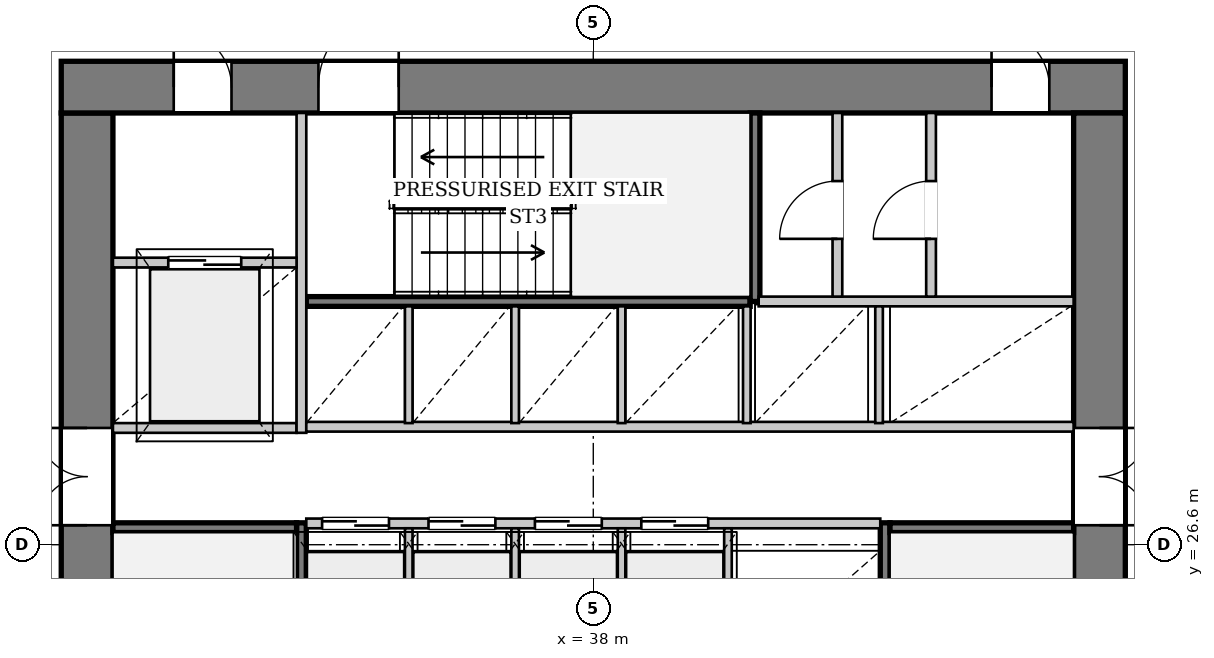
"""IFC4 building model, lengths in metres.
Left out: names, types, materials, properties, quantities, classifications, styles, units other than length and angle.
Written with IfcOpenShell. Run it as: python <this file> out.ifc"""

import sys

from ifc_helpers import new_model, si_unit, direction, frame, frame_2d, origin, place, context, subcontext, project, spatial, rectangle, extrude, source, transform, mapped, element, fill, save


model = new_model("IFC4")
c1 = context("Model", 3, precision=1e-05, world=origin(), true_north=direction((0.0, 1.0)))
c2 = subcontext(c1, "Body", "Model", "MODEL_VIEW")
j1 = project(units=[si_unit("LENGTHUNIT", "METRE"), si_unit("PLANEANGLEUNIT", "RADIAN")], contexts=[c1])
p1 = place(None, origin())
s1 = spatial("IfcSite", under=j1, at=p1, CompositionType="ELEMENT")
p2 = place(p1, origin())
s2 = spatial("IfcBuilding", under=s1, at=p2, CompositionType="ELEMENT")
p3 = place(p2, frame((0.0, 0.0, 61.25)))
s3 = spatial("IfcBuildingStorey", under=s2, at=p3, CompositionType="ELEMENT", Elevation=61.25)
p4 = place(p3, frame((29.675, 19.5, 0.0), z_axis=(0.0, 0.0, 1.0), x_axis=(0.0, 1.0, 0.0)))
e1 = element("IfcWall", 1, at=p4, inside=s3, PredefinedType="SHEAR", context=c2, shape_type="SweptSolid", body=[
    extrude(rectangle(XDim=14.2, YDim=0.85, at=frame_2d((7.1, 0.0))), origin(), (0.0, 0.0, 1.0), 3.3),
])
p5 = place(p4, frame((7.42, 0.0, 0.0)))
e2 = element("IfcOpeningElement", 2, at=p5, cuts=e1, PredefinedType="OPENING", context=c2, shape_type="SweptSolid", body=[
    extrude(rectangle(XDim=1.6, YDim=2.2, at=frame_2d((0.8, 1.1))), frame((0.0, 0.435, 0.0), z_axis=(0.0, -1.0, 0.0), x_axis=(1.0, 0.0, 0.0)), (0.0, 0.0, 1.0), 0.87),
])
p6 = place(p3, frame((29.25, 34.125, 0.0), z_axis=(0.0, 0.0, 1.0), x_axis=(1.0, 0.0, 0.0)))
e3 = element("IfcWall", 3, at=p6, inside=s3, PredefinedType="SHEAR", context=c2, shape_type="SweptSolid", body=[
    extrude(rectangle(XDim=17.5, YDim=0.85, at=frame_2d((8.75, 0.0))), origin(), (0.0, 0.0, 1.0), 3.3),
])
p7 = place(p6, frame((1.85, 0.0, 0.0)))
e4 = element("IfcOpeningElement", 4, at=p7, cuts=e3, PredefinedType="OPENING", context=c2, shape_type="SweptSolid", body=[
    extrude(rectangle(XDim=0.95, YDim=2.1, at=frame_2d((0.475, 1.05))), frame((0.0, 0.435, 0.0), z_axis=(0.0, -1.0, 0.0), x_axis=(1.0, 0.0, 0.0)), (0.0, 0.0, 1.0), 0.87),
])
p8 = place(p6, frame((4.23, 0.0, 0.0)))
e5 = element("IfcOpeningElement", 5, at=p8, cuts=e3, PredefinedType="OPENING", context=c2, shape_type="SweptSolid", body=[
    extrude(rectangle(XDim=1.32, YDim=2.2, at=frame_2d((0.66, 1.1))), frame((0.0, 0.435, 0.0), z_axis=(0.0, -1.0, 0.0), x_axis=(1.0, 0.0, 0.0)), (0.0, 0.0, 1.0), 0.87),
])
p9 = place(p6, frame((15.3, 0.0, 0.0)))
e6 = element("IfcOpeningElement", 6, at=p9, cuts=e3, PredefinedType="OPENING", context=c2, shape_type="SweptSolid", body=[
    extrude(rectangle(XDim=0.95, YDim=2.1, at=frame_2d((0.475, 1.05))), frame((0.0, 0.435, 0.0), z_axis=(0.0, -1.0, 0.0), x_axis=(1.0, 0.0, 0.0)), (0.0, 0.0, 1.0), 0.87),
])
p10 = place(p3, frame((46.325, 33.7, 0.0), z_axis=(0.0, 0.0, 1.0), x_axis=(0.0, -1.0, 0.0)))
e7 = element("IfcWall", 7, at=p10, inside=s3, PredefinedType="SHEAR", context=c2, shape_type="SweptSolid", body=[
    extrude(rectangle(XDim=14.2, YDim=0.85, at=frame_2d((7.1, 0.0))), origin(), (0.0, 0.0, 1.0), 3.3),
])
p11 = place(p10, frame((5.18, 0.0, 0.0)))
e8 = element("IfcOpeningElement", 8, at=p11, cuts=e7, PredefinedType="OPENING", context=c2, shape_type="SweptSolid", body=[
    extrude(rectangle(XDim=1.6, YDim=2.2, at=frame_2d((0.8, 1.1))), frame((0.0, 0.435, 0.0), z_axis=(0.0, -1.0, 0.0), x_axis=(1.0, 0.0, 0.0)), (0.0, 0.0, 1.0), 0.87),
])
p12 = place(p3, frame((33.2, 19.5, 0.0), z_axis=(0.0, 0.0, 1.0), x_axis=(0.0, 1.0, 0.0)))
e9 = element("IfcWall", 9, at=p12, inside=s3, PredefinedType="PARTITIONING", context=c2, shape_type="SweptSolid", body=[
    extrude(rectangle(XDim=7.46, YDim=0.16, at=frame_2d((3.73, 0.0))), origin(), (0.0, 0.0, 1.0), 3.3),
])
p13 = place(p12, frame((0.08, 0.0, 0.0)))
e10 = element("IfcOpeningElement", 10, at=p13, cuts=e9, PredefinedType="OPENING", context=c2, shape_type="SweptSolid", body=[
    extrude(rectangle(XDim=1.32, YDim=2.2, at=frame_2d((0.66, 1.1))), frame((0.0, 0.09, 0.0), z_axis=(0.0, -1.0, 0.0), x_axis=(1.0, 0.0, 0.0)), (0.0, 0.0, 1.0), 0.18),
])
p14 = place(p3, frame((30.1, 26.88, 0.0), z_axis=(0.0, 0.0, 1.0), x_axis=(1.0, 0.0, 0.0)))
e11 = element("IfcWall", 11, at=p14, inside=s3, PredefinedType="PARTITIONING", context=c2, shape_type="SweptSolid", body=[
    extrude(rectangle(XDim=3.02, YDim=0.16, at=frame_2d((1.51, 0.0))), origin(), (0.0, 0.0, 1.0), 3.3),
])
p15 = place(p3, frame((42.8, 26.96, 0.0), z_axis=(0.0, 0.0, 1.0), x_axis=(0.0, -1.0, 0.0)))
e12 = element("IfcWall", 12, at=p15, inside=s3, PredefinedType="PARTITIONING", context=c2, shape_type="SweptSolid", body=[
    extrude(rectangle(XDim=7.46, YDim=0.16, at=frame_2d((3.73, 0.0))), origin(), (0.0, 0.0, 1.0), 3.3),
])
p16 = place(p15, frame((6.06, 0.0, 0.0)))
e13 = element("IfcOpeningElement", 13, at=p16, cuts=e12, PredefinedType="OPENING", context=c2, shape_type="SweptSolid", body=[
    extrude(rectangle(XDim=1.32, YDim=2.2, at=frame_2d((0.66, 1.1))), frame((0.0, 0.09, 0.0), z_axis=(0.0, -1.0, 0.0), x_axis=(1.0, 0.0, 0.0)), (0.0, 0.0, 1.0), 0.18),
])
p17 = place(p3, frame((42.88, 26.88, 0.0), z_axis=(0.0, 0.0, 1.0), x_axis=(1.0, 0.0, 0.0)))
e14 = element("IfcWall", 14, at=p17, inside=s3, PredefinedType="PARTITIONING", context=c2, shape_type="SweptSolid", body=[
    extrude(rectangle(XDim=3.02, YDim=0.16, at=frame_2d((1.51, 0.0))), origin(), (0.0, 0.0, 1.0), 3.3),
])
p18 = place(p3, frame((33.28, 30.6, 0.0), z_axis=(0.0, 0.0, 1.0), x_axis=(1.0, 0.0, 0.0)))
e15 = element("IfcWall", 15, at=p18, inside=s3, PredefinedType="PARTITIONING", context=c2, shape_type="SweptSolid", body=[
    extrude(rectangle(XDim=7.3, YDim=0.16, at=frame_2d((3.65, 0.0))), origin(), (0.0, 0.0, 1.0), 3.3),
])
p19 = place(p3, frame((40.66, 30.6, 0.0), z_axis=(0.0, 0.0, 1.0), x_axis=(0.0, 1.0, 0.0)))
e16 = element("IfcWall", 16, at=p19, inside=s3, PredefinedType="PARTITIONING", context=c2, shape_type="SweptSolid", body=[
    extrude(rectangle(XDim=3.1, YDim=0.16, at=frame_2d((1.55, 0.0))), origin(), (0.0, 0.0, 1.0), 3.3),
])
p20 = place(p3, frame((30.1, 28.52, 0.0), z_axis=(0.0, 0.0, 1.0), x_axis=(1.0, 0.0, 0.0)))
e17 = element("IfcWall", 17, at=p20, inside=s3, PredefinedType="PARTITIONING", context=c2, shape_type="SweptSolid", body=[
    extrude(rectangle(XDim=3.02, YDim=0.16, at=frame_2d((1.51, 0.0))), origin(), (0.0, 0.0, 1.0), 3.3),
])
p21 = place(p3, frame((33.2, 28.44, 0.0), z_axis=(0.0, 0.0, 1.0), x_axis=(0.0, 1.0, 0.0)))
e18 = element("IfcWall", 18, at=p21, inside=s3, PredefinedType="PARTITIONING", context=c2, shape_type="SweptSolid", body=[
    extrude(rectangle(XDim=5.26, YDim=0.16, at=frame_2d((2.63, 0.0))), origin(), (0.0, 0.0, 1.0), 3.3),
])
p22 = place(p3, frame((30.1, 31.24, 0.0), z_axis=(0.0, 0.0, 1.0), x_axis=(1.0, 0.0, 0.0)))
e19 = element("IfcWall", 19, at=p22, inside=s3, PredefinedType="PARTITIONING", context=c2, shape_type="SweptSolid", body=[
    extrude(rectangle(XDim=3.02, YDim=0.16, at=frame_2d((1.51, 0.0))), origin(), (0.0, 0.0, 1.0), 3.3),
])
p23 = place(p22, frame((0.91, 0.0, 0.0)))
e20 = element("IfcOpeningElement", 20, at=p23, cuts=e19, PredefinedType="OPENING", context=c2, shape_type="SweptSolid", body=[
    extrude(rectangle(XDim=1.2, YDim=2.2, at=frame_2d((0.6, 1.1))), frame((0.0, 0.09, 0.0), z_axis=(0.0, -1.0, 0.0), x_axis=(1.0, 0.0, 0.0)), (0.0, 0.0, 1.0), 0.18),
])
p24 = place(p3, frame((33.28, 26.95, 0.0), z_axis=(0.0, 0.0, 1.0), x_axis=(1.0, 0.0, 0.0)))
e21 = element("IfcWall", 21, at=p24, inside=s3, PredefinedType="PARTITIONING", context=c2, shape_type="SweptSolid", body=[
    extrude(rectangle(XDim=9.44, YDim=0.16, at=frame_2d((4.72, 0.0))), origin(), (0.0, 0.0, 1.0), 3.3),
])
p25 = place(p24, frame((0.26, 0.0, 0.0)))
e22 = element("IfcOpeningElement", 22, at=p25, cuts=e21, PredefinedType="OPENING", context=c2, shape_type="SweptSolid", body=[
    extrude(rectangle(XDim=1.1, YDim=2.2, at=frame_2d((0.55, 1.1))), frame((0.0, 0.09, 0.0), z_axis=(0.0, -1.0, 0.0), x_axis=(1.0, 0.0, 0.0)), (0.0, 0.0, 1.0), 0.18),
])
p26 = place(p24, frame((2.01, 0.0, 0.0)))
e23 = element("IfcOpeningElement", 23, at=p26, cuts=e21, PredefinedType="OPENING", context=c2, shape_type="SweptSolid", body=[
    extrude(rectangle(XDim=1.1, YDim=2.2, at=frame_2d((0.55, 1.1))), frame((0.0, 0.09, 0.0), z_axis=(0.0, -1.0, 0.0), x_axis=(1.0, 0.0, 0.0)), (0.0, 0.0, 1.0), 0.18),
])
p27 = place(p24, frame((3.76, 0.0, 0.0)))
e24 = element("IfcOpeningElement", 24, at=p27, cuts=e21, PredefinedType="OPENING", context=c2, shape_type="SweptSolid", body=[
    extrude(rectangle(XDim=1.1, YDim=2.2, at=frame_2d((0.55, 1.1))), frame((0.0, 0.09, 0.0), z_axis=(0.0, -1.0, 0.0), x_axis=(1.0, 0.0, 0.0)), (0.0, 0.0, 1.0), 0.18),
])
p28 = place(p24, frame((5.51, 0.0, 0.0)))
e25 = element("IfcOpeningElement", 25, at=p28, cuts=e21, PredefinedType="OPENING", context=c2, shape_type="SweptSolid", body=[
    extrude(rectangle(XDim=1.1, YDim=2.2, at=frame_2d((0.55, 1.1))), frame((0.0, 0.09, 0.0), z_axis=(0.0, -1.0, 0.0), x_axis=(1.0, 0.0, 0.0)), (0.0, 0.0, 1.0), 0.18),
])
for number, where, z_axis, x_axis in (
    (26, (34.965, 24.56, 0.0), (0.0, 0.0, 1.0), (0.0, 1.0, 0.0)),
    (27, (36.715, 24.56, 0.0), (0.0, 0.0, 1.0), (0.0, 1.0, 0.0)),
    (28, (38.465, 24.56, 0.0), (0.0, 0.0, 1.0), (0.0, 1.0, 0.0)),
    (29, (40.215, 24.56, 0.0), (0.0, 0.0, 1.0), (0.0, 1.0, 0.0)),
):
    element("IfcWall", number, at=place(p3, frame(where, z_axis=z_axis, x_axis=x_axis)), inside=s3, PredefinedType="PARTITIONING", context=c2, shape_type="SweptSolid", body=[
        extrude(rectangle(XDim=2.31, YDim=0.125, at=frame_2d((1.155, 0.0))), origin(), (0.0, 0.0, 1.0), 3.3),
    ])
p29 = place(p3, frame((33.28, 28.54, 0.0), z_axis=(0.0, 0.0, 1.0), x_axis=(1.0, 0.0, 0.0)))
e30 = element("IfcWall", 30, at=p29, inside=s3, PredefinedType="PARTITIONING", context=c2, shape_type="SweptSolid", body=[
    extrude(rectangle(XDim=12.62, YDim=0.16, at=frame_2d((6.31, 0.0))), origin(), (0.0, 0.0, 1.0), 3.3),
])
p30 = place(p3, frame((40.72, 30.6, 0.0), z_axis=(0.0, 0.0, 1.0), x_axis=(1.0, 0.0, 0.0)))
e31 = element("IfcWall", 31, at=p30, inside=s3, PredefinedType="PARTITIONING", context=c2, shape_type="SweptSolid", body=[
    extrude(rectangle(XDim=5.18, YDim=0.16, at=frame_2d((2.59, 0.0))), origin(), (0.0, 0.0, 1.0), 3.3),
])
for number, where, z_axis, x_axis in (
    (32, (34.965, 28.6, 0.0), (0.0, 0.0, 1.0), (0.0, 1.0, 0.0)),
    (33, (36.715, 28.6, 0.0), (0.0, 0.0, 1.0), (0.0, 1.0, 0.0)),
    (34, (38.465, 28.6, 0.0), (0.0, 0.0, 1.0), (0.0, 1.0, 0.0)),
    (35, (40.525, 28.6, 0.0), (0.0, 0.0, 1.0), (0.0, 1.0, 0.0)),
    (36, (42.7, 28.6, 0.0), (0.0, 0.0, 1.0), (0.0, 1.0, 0.0)),
):
    element("IfcWall", number, at=place(p3, frame(where, z_axis=z_axis, x_axis=x_axis)), inside=s3, PredefinedType="PARTITIONING", context=c2, shape_type="SweptSolid", body=[
        extrude(rectangle(XDim=1.92, YDim=0.125, at=frame_2d((0.96, 0.0))), origin(), (0.0, 0.0, 1.0), 3.3),
    ])
p31 = place(p3, frame((42.015, 30.68, 0.0), z_axis=(0.0, 0.0, 1.0), x_axis=(0.0, 1.0, 0.0)))
e37 = element("IfcWall", 37, at=p31, inside=s3, PredefinedType="PARTITIONING", context=c2, shape_type="SweptSolid", body=[
    extrude(rectangle(XDim=3.02, YDim=0.16, at=frame_2d((1.51, 0.0))), origin(), (0.0, 0.0, 1.0), 3.3),
])
p32 = place(p31, frame((0.95, 0.0, 0.0)))
e38 = element("IfcOpeningElement", 38, at=p32, cuts=e37, PredefinedType="OPENING", context=c2, shape_type="SweptSolid", body=[
    extrude(rectangle(XDim=0.95, YDim=2.1, at=frame_2d((0.475, 1.05))), frame((0.0, 0.09, 0.0), z_axis=(0.0, -1.0, 0.0), x_axis=(1.0, 0.0, 0.0)), (0.0, 0.0, 1.0), 0.18),
])
p33 = place(p3, frame((43.555, 30.68, 0.0), z_axis=(0.0, 0.0, 1.0), x_axis=(0.0, 1.0, 0.0)))
e39 = element("IfcWall", 39, at=p33, inside=s3, PredefinedType="PARTITIONING", context=c2, shape_type="SweptSolid", body=[
    extrude(rectangle(XDim=3.02, YDim=0.16, at=frame_2d((1.51, 0.0))), origin(), (0.0, 0.0, 1.0), 3.3),
])
p34 = place(p33, frame((0.95, 0.0, 0.0)))
e40 = element("IfcOpeningElement", 40, at=p34, cuts=e39, PredefinedType="OPENING", context=c2, shape_type="SweptSolid", body=[
    extrude(rectangle(XDim=0.95, YDim=2.1, at=frame_2d((0.475, 1.05))), frame((0.0, 0.09, 0.0), z_axis=(0.0, -1.0, 0.0), x_axis=(1.0, 0.0, 0.0)), (0.0, 0.0, 1.0), 0.18),
])
m1 = source(origin(), c2, "Body", "SweptSolid", [
    extrude(rectangle(XDim=1.6, YDim=2.2, at=frame_2d((0.8, 1.1))), frame((0.0, 0.025, 0.0), z_axis=(0.0, -1.0, 0.0), x_axis=(1.0, 0.0, 0.0)), (0.0, 0.0, 1.0), 0.05),
])
p35 = place(p5, origin())
e41 = element("IfcDoor", 41, at=p35, inside=s3, OperationType="DOUBLE_DOOR_SINGLE_SWING", PredefinedType="DOOR", context=c2, shape_type="MappedRepresentation", body=[
    mapped(m1, transform((0.0, 0.0, 0.0), x_axis=(1.0, 0.0, 0.0), y_axis=(0.0, 1.0, 0.0), z_axis=(0.0, 0.0, 1.0), scale=1.0)),
])
fill(e2, e41)
m2 = source(origin(), c2, "Body", "SweptSolid", [
    extrude(rectangle(XDim=0.95, YDim=2.1, at=frame_2d((0.475, 1.05))), frame((0.0, 0.025, 0.0), z_axis=(0.0, -1.0, 0.0), x_axis=(1.0, 0.0, 0.0)), (0.0, 0.0, 1.0), 0.05),
])
p36 = place(p7, origin())
e42 = element("IfcDoor", 42, at=p36, inside=s3, OperationType="SINGLE_SWING_LEFT", PredefinedType="DOOR", context=c2, shape_type="MappedRepresentation", body=[
    mapped(m2, transform((0.0, 0.0, 0.0), x_axis=(1.0, 0.0, 0.0), y_axis=(0.0, 1.0, 0.0), z_axis=(0.0, 0.0, 1.0), scale=1.0)),
])
fill(e4, e42)
m3 = source(origin(), c2, "Body", "SweptSolid", [
    extrude(rectangle(XDim=1.32, YDim=2.2, at=frame_2d((0.66, 1.1))), frame((0.0, 0.025, 0.0), z_axis=(0.0, -1.0, 0.0), x_axis=(1.0, 0.0, 0.0)), (0.0, 0.0, 1.0), 0.05),
])
p37 = place(p8, origin())
e43 = element("IfcDoor", 43, at=p37, inside=s3, OperationType="SINGLE_SWING_RIGHT", PredefinedType="DOOR", context=c2, shape_type="MappedRepresentation", body=[
    mapped(m3, transform((0.0, 0.0, 0.0), x_axis=(1.0, 0.0, 0.0), y_axis=(0.0, 1.0, 0.0), z_axis=(0.0, 0.0, 1.0), scale=1.0)),
])
fill(e5, e43)
p38 = place(p11, origin())
e44 = element("IfcDoor", 44, at=p38, inside=s3, OperationType="DOUBLE_DOOR_SINGLE_SWING", PredefinedType="DOOR", context=c2, shape_type="MappedRepresentation", body=[
    mapped(m1, transform((0.0, 0.0, 0.0), x_axis=(1.0, 0.0, 0.0), y_axis=(0.0, 1.0, 0.0), z_axis=(0.0, 0.0, 1.0), scale=1.0)),
])
fill(e8, e44)
m4 = source(origin(), c2, "Body", "SweptSolid", [
    extrude(rectangle(XDim=1.2, YDim=2.2, at=frame_2d((0.6, 1.1))), frame((0.0, 0.025, 0.0), z_axis=(0.0, -1.0, 0.0), x_axis=(1.0, 0.0, 0.0)), (0.0, 0.0, 1.0), 0.05),
])
p39 = place(p23, origin())
e45 = element("IfcDoor", 45, at=p39, inside=s3, OperationType="DOUBLE_DOOR_SLIDING", PredefinedType="DOOR", context=c2, shape_type="MappedRepresentation", body=[
    mapped(m4, transform((0.0, 0.0, 0.0), x_axis=(1.0, 0.0, 0.0), y_axis=(0.0, 1.0, 0.0), z_axis=(0.0, 0.0, 1.0), scale=1.0)),
])
fill(e20, e45)
m5 = source(origin(), c2, "Body", "SweptSolid", [
    extrude(rectangle(XDim=1.1, YDim=2.2, at=frame_2d((0.55, 1.1))), frame((0.0, 0.025, 0.0), z_axis=(0.0, -1.0, 0.0), x_axis=(1.0, 0.0, 0.0)), (0.0, 0.0, 1.0), 0.05),
])
p40 = place(p25, origin())
e46 = element("IfcDoor", 46, at=p40, inside=s3, OperationType="DOUBLE_DOOR_SLIDING", PredefinedType="DOOR", context=c2, shape_type="MappedRepresentation", body=[
    mapped(m5, transform((0.0, 0.0, 0.0), x_axis=(1.0, 0.0, 0.0), y_axis=(0.0, 1.0, 0.0), z_axis=(0.0, 0.0, 1.0), scale=1.0)),
])
fill(e22, e46)
p41 = place(p26, origin())
e47 = element("IfcDoor", 47, at=p41, inside=s3, OperationType="DOUBLE_DOOR_SLIDING", PredefinedType="DOOR", context=c2, shape_type="MappedRepresentation", body=[
    mapped(m5, transform((0.0, 0.0, 0.0), x_axis=(1.0, 0.0, 0.0), y_axis=(0.0, 1.0, 0.0), z_axis=(0.0, 0.0, 1.0), scale=1.0)),
])
fill(e23, e47)
p42 = place(p27, origin())
e48 = element("IfcDoor", 48, at=p42, inside=s3, OperationType="DOUBLE_DOOR_SLIDING", PredefinedType="DOOR", context=c2, shape_type="MappedRepresentation", body=[
    mapped(m5, transform((0.0, 0.0, 0.0), x_axis=(1.0, 0.0, 0.0), y_axis=(0.0, 1.0, 0.0), z_axis=(0.0, 0.0, 1.0), scale=1.0)),
])
fill(e24, e48)
p43 = place(p28, origin())
e49 = element("IfcDoor", 49, at=p43, inside=s3, OperationType="DOUBLE_DOOR_SLIDING", PredefinedType="DOOR", context=c2, shape_type="MappedRepresentation", body=[
    mapped(m5, transform((0.0, 0.0, 0.0), x_axis=(1.0, 0.0, 0.0), y_axis=(0.0, 1.0, 0.0), z_axis=(0.0, 0.0, 1.0), scale=1.0)),
])
fill(e25, e49)
p44 = place(p32, origin())
e50 = element("IfcDoor", 50, at=p44, inside=s3, OperationType="SINGLE_SWING_LEFT", PredefinedType="DOOR", context=c2, shape_type="MappedRepresentation", body=[
    mapped(m2, transform((0.0, 0.0, 0.0), x_axis=(1.0, 0.0, 0.0), y_axis=(0.0, 1.0, 0.0), z_axis=(0.0, 0.0, 1.0), scale=1.0)),
])
fill(e38, e50)
p45 = place(p34, origin())
e51 = element("IfcDoor", 51, at=p45, inside=s3, OperationType="SINGLE_SWING_LEFT", PredefinedType="DOOR", context=c2, shape_type="MappedRepresentation", body=[
    mapped(m2, transform((0.0, 0.0, 0.0), x_axis=(1.0, 0.0, 0.0), y_axis=(0.0, 1.0, 0.0), z_axis=(0.0, 0.0, 1.0), scale=1.0)),
])
fill(e40, e51)
p46 = place(p9, origin())
e52 = element("IfcDoor", 52, at=p46, inside=s3, OperationType="SINGLE_SWING_LEFT", PredefinedType="DOOR", context=c2, shape_type="MappedRepresentation", body=[
    mapped(m2, transform((0.0, 0.0, 0.0), x_axis=(1.0, 0.0, 0.0), y_axis=(0.0, 1.0, 0.0), z_axis=(0.0, 0.0, 1.0), scale=1.0)),
])
fill(e6, e52)
save(model, sys.argv[1])
